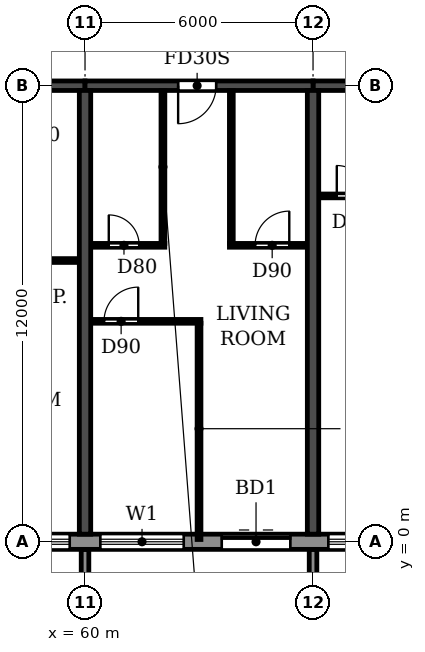
"""IFC4 building model, lengths in metres.
Left out: names, types, materials, properties, quantities, classifications, styles, units other than length and angle.
Written with IfcOpenShell. Run it as: python <this file> out.ifc"""

import sys

from ifc_helpers import new_model, si_unit, direction, frame, frame_2d, origin, place, context, subcontext, project, spatial, polyline, rectangle, outline, extrude, source, transform, mapped, element, fill, save


model = new_model("IFC4")
c1 = context("Model", 3, precision=1e-05, world=origin(), true_north=direction((0.0, 1.0)))
c2 = subcontext(c1, "Body", "Model", "MODEL_VIEW")
j1 = project(units=[si_unit("LENGTHUNIT", "METRE"), si_unit("PLANEANGLEUNIT", "RADIAN")], contexts=[c1])
p1 = place(None, origin())
s1 = spatial("IfcSite", under=j1, at=p1, CompositionType="ELEMENT")
p2 = place(p1, origin())
s2 = spatial("IfcBuilding", under=s1, at=p2, CompositionType="ELEMENT")
p3 = place(p2, frame((0.0, 0.0, 142.2)))
s3 = spatial("IfcBuildingStorey", under=s2, at=p3, CompositionType="ELEMENT", Elevation=142.2)
for number, where, z_axis, x_axis in (
    (1, (60.0, 0.2, 0.0), (0.0, 0.0, 1.0), (0.0, 1.0, 0.0)),
    (2, (66.0, 0.2, 0.0), (0.0, 0.0, 1.0), (0.0, 1.0, 0.0)),
):
    element("IfcWall", number, at=place(p3, frame(where, z_axis=z_axis, x_axis=x_axis)), inside=s3, PredefinedType="SHEAR", context=c2, shape_type="SweptSolid", body=[
        extrude(rectangle(XDim=11.675, YDim=0.3, at=frame_2d((5.837, 0.0))), origin(), (0.0, 0.0, 1.0), 3.07),
    ])
p4 = place(p3, frame((54.0, 12.0, 0.0), z_axis=(0.0, 0.0, 1.0), x_axis=(1.0, 0.0, 0.0)))
e3 = element("IfcWall", 3, at=p4, inside=s3, PredefinedType="SHEAR", context=c2, shape_type="SweptSolid", body=[
    extrude(rectangle(XDim=6.0, YDim=0.25, at=frame_2d((3.0, 0.0))), origin(), (0.0, 0.0, 1.0), 2.47),
])
p5 = place(p4, frame((2.45, 0.0, 0.0)))
e4 = element("IfcOpeningElement", 4, at=p5, cuts=e3, PredefinedType="OPENING", context=c2, shape_type="SweptSolid", body=[
    extrude(rectangle(XDim=1.0, YDim=2.1, at=frame_2d((0.5, 1.05))), frame((0.0, 0.135, 0.0), z_axis=(0.0, -1.0, 0.0), x_axis=(1.0, 0.0, 0.0)), (0.0, 0.0, 1.0), 0.27),
])
p6 = place(p3, frame((60.0, 12.0, 0.0), z_axis=(0.0, 0.0, 1.0), x_axis=(1.0, 0.0, 0.0)))
e5 = element("IfcWall", 5, at=p6, inside=s3, PredefinedType="SHEAR", context=c2, shape_type="SweptSolid", body=[
    extrude(rectangle(XDim=6.0, YDim=0.25, at=frame_2d((3.0, 0.0))), origin(), (0.0, 0.0, 1.0), 2.47),
])
p7 = place(p6, frame((2.45, 0.0, 0.0)))
e6 = element("IfcOpeningElement", 6, at=p7, cuts=e5, PredefinedType="OPENING", context=c2, shape_type="SweptSolid", body=[
    extrude(rectangle(XDim=1.0, YDim=2.1, at=frame_2d((0.5, 1.05))), frame((0.0, 0.135, 0.0), z_axis=(0.0, -1.0, 0.0), x_axis=(1.0, 0.0, 0.0)), (0.0, 0.0, 1.0), 0.27),
])
p8 = place(p3, frame((66.0, 12.0, 0.0), z_axis=(0.0, 0.0, 1.0), x_axis=(1.0, 0.0, 0.0)))
e7 = element("IfcWall", 7, at=p8, inside=s3, PredefinedType="SHEAR", context=c2, shape_type="SweptSolid", body=[
    extrude(rectangle(XDim=6.0, YDim=0.25, at=frame_2d((3.0, 0.0))), origin(), (0.0, 0.0, 1.0), 2.47),
])
p9 = place(p8, frame((2.45, 0.0, 0.0)))
e8 = element("IfcOpeningElement", 8, at=p9, cuts=e7, PredefinedType="OPENING", context=c2, shape_type="SweptSolid", body=[
    extrude(rectangle(XDim=1.0, YDim=2.1, at=frame_2d((0.5, 1.05))), frame((0.0, 0.135, 0.0), z_axis=(0.0, -1.0, 0.0), x_axis=(1.0, 0.0, 0.0)), (0.0, 0.0, 1.0), 0.27),
])
p10 = place(p3, frame((16.683, 0.0, 0.0), z_axis=(0.0, 0.0, 1.0), x_axis=(1.0, 0.0, 0.0)))
e9 = element("IfcWall", 9, at=p10, inside=s3, PredefinedType="STANDARD", context=c2, shape_type="SweptSolid", body=[
    extrude(rectangle(XDim=68.634, YDim=0.4, at=frame_2d((34.317, 0.0))), origin(), (0.0, 0.0, 1.0), 3.07),
])
p11 = place(p10, frame((1.717, 0.0, 0.9)))
e10 = element("IfcOpeningElement", 10, at=p11, cuts=e9, PredefinedType="OPENING", context=c2, shape_type="SweptSolid", body=[
    extrude(rectangle(XDim=2.2, YDim=1.5, at=frame_2d((1.1, 0.75))), frame((0.0, 0.21, 0.0), z_axis=(0.0, -1.0, 0.0), x_axis=(1.0, 0.0, 0.0)), (0.0, 0.0, 1.0), 0.42),
])
p12 = place(p10, frame((4.717, 0.0, 0.9)))
e11 = element("IfcOpeningElement", 11, at=p12, cuts=e9, PredefinedType="OPENING", context=c2, shape_type="SweptSolid", body=[
    extrude(rectangle(XDim=2.2, YDim=1.5, at=frame_2d((1.1, 0.75))), frame((0.0, 0.21, 0.0), z_axis=(0.0, -1.0, 0.0), x_axis=(1.0, 0.0, 0.0)), (0.0, 0.0, 1.0), 0.42),
])
p13 = place(p10, frame((7.717, 0.0, 0.9)))
e12 = element("IfcOpeningElement", 12, at=p13, cuts=e9, PredefinedType="OPENING", context=c2, shape_type="SweptSolid", body=[
    extrude(rectangle(XDim=2.2, YDim=1.5, at=frame_2d((1.1, 0.75))), frame((0.0, 0.21, 0.0), z_axis=(0.0, -1.0, 0.0), x_axis=(1.0, 0.0, 0.0)), (0.0, 0.0, 1.0), 0.42),
])
p14 = place(p10, frame((10.717, 0.0, 0.9)))
e13 = element("IfcOpeningElement", 13, at=p14, cuts=e9, PredefinedType="OPENING", context=c2, shape_type="SweptSolid", body=[
    extrude(rectangle(XDim=2.2, YDim=1.5, at=frame_2d((1.1, 0.75))), frame((0.0, 0.21, 0.0), z_axis=(0.0, -1.0, 0.0), x_axis=(1.0, 0.0, 0.0)), (0.0, 0.0, 1.0), 0.42),
])
p15 = place(p10, frame((13.717, 0.0, 0.9)))
e14 = element("IfcOpeningElement", 14, at=p15, cuts=e9, PredefinedType="OPENING", context=c2, shape_type="SweptSolid", body=[
    extrude(rectangle(XDim=2.2, YDim=1.5, at=frame_2d((1.1, 0.75))), frame((0.0, 0.21, 0.0), z_axis=(0.0, -1.0, 0.0), x_axis=(1.0, 0.0, 0.0)), (0.0, 0.0, 1.0), 0.42),
])
p16 = place(p10, frame((16.717, 0.0, 0.9)))
e15 = element("IfcOpeningElement", 15, at=p16, cuts=e9, PredefinedType="OPENING", context=c2, shape_type="SweptSolid", body=[
    extrude(rectangle(XDim=2.2, YDim=1.5, at=frame_2d((1.1, 0.75))), frame((0.0, 0.21, 0.0), z_axis=(0.0, -1.0, 0.0), x_axis=(1.0, 0.0, 0.0)), (0.0, 0.0, 1.0), 0.42),
])
p17 = place(p10, frame((19.717, 0.0, 0.9)))
e16 = element("IfcOpeningElement", 16, at=p17, cuts=e9, PredefinedType="OPENING", context=c2, shape_type="SweptSolid", body=[
    extrude(rectangle(XDim=2.2, YDim=1.5, at=frame_2d((1.1, 0.75))), frame((0.0, 0.21, 0.0), z_axis=(0.0, -1.0, 0.0), x_axis=(1.0, 0.0, 0.0)), (0.0, 0.0, 1.0), 0.42),
])
p18 = place(p10, frame((22.717, 0.0, 0.9)))
e17 = element("IfcOpeningElement", 17, at=p18, cuts=e9, PredefinedType="OPENING", context=c2, shape_type="SweptSolid", body=[
    extrude(rectangle(XDim=2.2, YDim=1.5, at=frame_2d((1.1, 0.75))), frame((0.0, 0.21, 0.0), z_axis=(0.0, -1.0, 0.0), x_axis=(1.0, 0.0, 0.0)), (0.0, 0.0, 1.0), 0.42),
])
p19 = place(p10, frame((25.717, 0.0, 0.9)))
e18 = element("IfcOpeningElement", 18, at=p19, cuts=e9, PredefinedType="OPENING", context=c2, shape_type="SweptSolid", body=[
    extrude(rectangle(XDim=2.2, YDim=1.5, at=frame_2d((1.1, 0.75))), frame((0.0, 0.21, 0.0), z_axis=(0.0, -1.0, 0.0), x_axis=(1.0, 0.0, 0.0)), (0.0, 0.0, 1.0), 0.42),
])
p20 = place(p10, frame((28.717, 0.0, 0.9)))
e19 = element("IfcOpeningElement", 19, at=p20, cuts=e9, PredefinedType="OPENING", context=c2, shape_type="SweptSolid", body=[
    extrude(rectangle(XDim=2.2, YDim=1.5, at=frame_2d((1.1, 0.75))), frame((0.0, 0.21, 0.0), z_axis=(0.0, -1.0, 0.0), x_axis=(1.0, 0.0, 0.0)), (0.0, 0.0, 1.0), 0.42),
])
p21 = place(p10, frame((31.717, 0.0, 0.9)))
e20 = element("IfcOpeningElement", 20, at=p21, cuts=e9, PredefinedType="OPENING", context=c2, shape_type="SweptSolid", body=[
    extrude(rectangle(XDim=2.2, YDim=1.5, at=frame_2d((1.1, 0.75))), frame((0.0, 0.21, 0.0), z_axis=(0.0, -1.0, 0.0), x_axis=(1.0, 0.0, 0.0)), (0.0, 0.0, 1.0), 0.42),
])
p22 = place(p10, frame((34.917, 0.0, 0.0)))
e21 = element("IfcOpeningElement", 21, at=p22, cuts=e9, PredefinedType="OPENING", context=c2, shape_type="SweptSolid", body=[
    extrude(rectangle(XDim=1.8, YDim=2.4, at=frame_2d((0.9, 1.2))), frame((0.0, 0.21, 0.0), z_axis=(0.0, -1.0, 0.0), x_axis=(1.0, 0.0, 0.0)), (0.0, 0.0, 1.0), 0.42),
])
p23 = place(p10, frame((37.717, 0.0, 0.9)))
e22 = element("IfcOpeningElement", 22, at=p23, cuts=e9, PredefinedType="OPENING", context=c2, shape_type="SweptSolid", body=[
    extrude(rectangle(XDim=2.2, YDim=1.5, at=frame_2d((1.1, 0.75))), frame((0.0, 0.21, 0.0), z_axis=(0.0, -1.0, 0.0), x_axis=(1.0, 0.0, 0.0)), (0.0, 0.0, 1.0), 0.42),
])
p24 = place(p10, frame((40.717, 0.0, 0.9)))
e23 = element("IfcOpeningElement", 23, at=p24, cuts=e9, PredefinedType="OPENING", context=c2, shape_type="SweptSolid", body=[
    extrude(rectangle(XDim=2.2, YDim=1.5, at=frame_2d((1.1, 0.75))), frame((0.0, 0.21, 0.0), z_axis=(0.0, -1.0, 0.0), x_axis=(1.0, 0.0, 0.0)), (0.0, 0.0, 1.0), 0.42),
])
p25 = place(p10, frame((43.717, 0.0, 0.9)))
e24 = element("IfcOpeningElement", 24, at=p25, cuts=e9, PredefinedType="OPENING", context=c2, shape_type="SweptSolid", body=[
    extrude(rectangle(XDim=2.2, YDim=1.5, at=frame_2d((1.1, 0.75))), frame((0.0, 0.21, 0.0), z_axis=(0.0, -1.0, 0.0), x_axis=(1.0, 0.0, 0.0)), (0.0, 0.0, 1.0), 0.42),
])
p26 = place(p10, frame((46.917, 0.0, 0.0)))
e25 = element("IfcOpeningElement", 25, at=p26, cuts=e9, PredefinedType="OPENING", context=c2, shape_type="SweptSolid", body=[
    extrude(rectangle(XDim=1.8, YDim=2.4, at=frame_2d((0.9, 1.2))), frame((0.0, 0.21, 0.0), z_axis=(0.0, -1.0, 0.0), x_axis=(1.0, 0.0, 0.0)), (0.0, 0.0, 1.0), 0.42),
])
p27 = place(p10, frame((49.717, 0.0, 0.9)))
e26 = element("IfcOpeningElement", 26, at=p27, cuts=e9, PredefinedType="OPENING", context=c2, shape_type="SweptSolid", body=[
    extrude(rectangle(XDim=2.2, YDim=1.5, at=frame_2d((1.1, 0.75))), frame((0.0, 0.21, 0.0), z_axis=(0.0, -1.0, 0.0), x_axis=(1.0, 0.0, 0.0)), (0.0, 0.0, 1.0), 0.42),
])
p28 = place(p10, frame((52.717, 0.0, 0.9)))
e27 = element("IfcOpeningElement", 27, at=p28, cuts=e9, PredefinedType="OPENING", context=c2, shape_type="SweptSolid", body=[
    extrude(rectangle(XDim=2.2, YDim=1.5, at=frame_2d((1.1, 0.75))), frame((0.0, 0.21, 0.0), z_axis=(0.0, -1.0, 0.0), x_axis=(1.0, 0.0, 0.0)), (0.0, 0.0, 1.0), 0.42),
])
p29 = place(p10, frame((55.717, 0.0, 0.9)))
e28 = element("IfcOpeningElement", 28, at=p29, cuts=e9, PredefinedType="OPENING", context=c2, shape_type="SweptSolid", body=[
    extrude(rectangle(XDim=2.2, YDim=1.5, at=frame_2d((1.1, 0.75))), frame((0.0, 0.21, 0.0), z_axis=(0.0, -1.0, 0.0), x_axis=(1.0, 0.0, 0.0)), (0.0, 0.0, 1.0), 0.42),
])
p30 = place(p10, frame((58.717, 0.0, 0.9)))
e29 = element("IfcOpeningElement", 29, at=p30, cuts=e9, PredefinedType="OPENING", context=c2, shape_type="SweptSolid", body=[
    extrude(rectangle(XDim=2.2, YDim=1.5, at=frame_2d((1.1, 0.75))), frame((0.0, 0.21, 0.0), z_axis=(0.0, -1.0, 0.0), x_axis=(1.0, 0.0, 0.0)), (0.0, 0.0, 1.0), 0.42),
])
p31 = place(p10, frame((61.717, 0.0, 0.9)))
e30 = element("IfcOpeningElement", 30, at=p31, cuts=e9, PredefinedType="OPENING", context=c2, shape_type="SweptSolid", body=[
    extrude(rectangle(XDim=2.2, YDim=1.5, at=frame_2d((1.1, 0.75))), frame((0.0, 0.21, 0.0), z_axis=(0.0, -1.0, 0.0), x_axis=(1.0, 0.0, 0.0)), (0.0, 0.0, 1.0), 0.42),
])
p32 = place(p10, frame((64.717, 0.0, 0.9)))
e31 = element("IfcOpeningElement", 31, at=p32, cuts=e9, PredefinedType="OPENING", context=c2, shape_type="SweptSolid", body=[
    extrude(rectangle(XDim=2.2, YDim=1.5, at=frame_2d((1.1, 0.75))), frame((0.0, 0.21, 0.0), z_axis=(0.0, -1.0, 0.0), x_axis=(1.0, 0.0, 0.0)), (0.0, 0.0, 1.0), 0.42),
])
m1 = source(origin(), c2, "Body", "SweptSolid", [
    extrude(outline(polyline([(0.0, 0.0), (0.2, 0.0), (0.2, 1.65), (0.0, 1.65), (0.0, 0.0)])), origin(), (0.0, 0.0, 1.0), 3.1),
])
for number, where in (
    (32, (59.9, -1.85, 0.0)),
    (33, (65.9, -1.85, 0.0)),
):
    element("IfcWall", number, at=place(p3, frame(where)), inside=s3, PredefinedType="STANDARD", context=c2, shape_type="MappedRepresentation", body=[
        mapped(m1, transform((0.0, 0.0, 0.0))),
    ])
p33 = place(p3, frame((60.16, 5.8, 0.0), z_axis=(0.0, 0.0, 1.0), x_axis=(1.0, 0.0, 0.0)))
e34 = element("IfcWall", 34, at=p33, inside=s3, PredefinedType="PARTITIONING", context=c2, shape_type="SweptSolid", body=[
    extrude(rectangle(XDim=2.89, YDim=0.1, at=frame_2d((1.445, 0.0))), origin(), (0.0, 0.0, 1.0), 3.07),
])
p34 = place(p33, frame((0.34, 0.0, 0.0)))
e35 = element("IfcOpeningElement", 35, at=p34, cuts=e34, PredefinedType="OPENING", context=c2, shape_type="SweptSolid", body=[
    extrude(rectangle(XDim=0.9, YDim=2.1, at=frame_2d((0.45, 1.05))), frame((0.0, 0.06, 0.0), z_axis=(0.0, -1.0, 0.0), x_axis=(1.0, 0.0, 0.0)), (0.0, 0.0, 1.0), 0.12),
])
p35 = place(p3, frame((57.8, 7.4, 0.0), z_axis=(0.0, 0.0, 1.0), x_axis=(1.0, 0.0, 0.0)))
e36 = element("IfcWall", 36, at=p35, inside=s3, PredefinedType="PARTITIONING", context=c2, shape_type="SweptSolid", body=[
    extrude(rectangle(XDim=2.04, YDim=0.1, at=frame_2d((1.02, 0.0))), origin(), (0.0, 0.0, 1.0), 3.07),
])
p36 = place(p3, frame((60.16, 7.8, 0.0), z_axis=(0.0, 0.0, 1.0), x_axis=(1.0, 0.0, 0.0)))
e37 = element("IfcWall", 37, at=p36, inside=s3, PredefinedType="PARTITIONING", context=c2, shape_type="SweptSolid", body=[
    extrude(rectangle(XDim=1.94, YDim=0.1, at=frame_2d((0.97, 0.0))), origin(), (0.0, 0.0, 1.0), 3.07),
])
p37 = place(p36, frame((0.465, 0.0, 0.0)))
e38 = element("IfcOpeningElement", 38, at=p37, cuts=e37, PredefinedType="OPENING", context=c2, shape_type="SweptSolid", body=[
    extrude(rectangle(XDim=0.8, YDim=2.1, at=frame_2d((0.4, 1.05))), frame((0.0, 0.06, 0.0), z_axis=(0.0, -1.0, 0.0), x_axis=(1.0, 0.0, 0.0)), (0.0, 0.0, 1.0), 0.12),
])
p38 = place(p3, frame((63.8, 7.8, 0.0), z_axis=(0.0, 0.0, 1.0), x_axis=(1.0, 0.0, 0.0)))
e39 = element("IfcWall", 39, at=p38, inside=s3, PredefinedType="PARTITIONING", context=c2, shape_type="SweptSolid", body=[
    extrude(rectangle(XDim=2.04, YDim=0.1, at=frame_2d((1.02, 0.0))), origin(), (0.0, 0.0, 1.0), 3.07),
])
p39 = place(p38, frame((0.675, 0.0, 0.0)))
e40 = element("IfcOpeningElement", 40, at=p39, cuts=e39, PredefinedType="OPENING", context=c2, shape_type="SweptSolid", body=[
    extrude(rectangle(XDim=0.9, YDim=2.1, at=frame_2d((0.45, 1.05))), frame((0.0, 0.06, 0.0), z_axis=(0.0, -1.0, 0.0), x_axis=(1.0, 0.0, 0.0)), (0.0, 0.0, 1.0), 0.12),
])
p40 = place(p3, frame((66.16, 9.1, 0.0), z_axis=(0.0, 0.0, 1.0), x_axis=(1.0, 0.0, 0.0)))
e41 = element("IfcWall", 41, at=p40, inside=s3, PredefinedType="PARTITIONING", context=c2, shape_type="SweptSolid", body=[
    extrude(rectangle(XDim=1.94, YDim=0.1, at=frame_2d((0.97, 0.0))), origin(), (0.0, 0.0, 1.0), 3.07),
])
p41 = place(p40, frame((0.465, 0.0, 0.0)))
e42 = element("IfcOpeningElement", 42, at=p41, cuts=e41, PredefinedType="OPENING", context=c2, shape_type="SweptSolid", body=[
    extrude(rectangle(XDim=0.8, YDim=2.1, at=frame_2d((0.4, 1.05))), frame((0.0, 0.06, 0.0), z_axis=(0.0, -1.0, 0.0), x_axis=(1.0, 0.0, 0.0)), (0.0, 0.0, 1.0), 0.12),
])
p42 = place(p3, frame((62.05, 7.85, 0.0), z_axis=(0.0, 0.0, 1.0), x_axis=(0.0, 1.0, 0.0)))
e43 = element("IfcWall", 43, at=p42, inside=s3, PredefinedType="PARTITIONING", context=c2, shape_type="SweptSolid", body=[
    extrude(rectangle(XDim=4.015, YDim=0.1, at=frame_2d((2.007, 0.0))), origin(), (0.0, 0.0, 1.0), 3.07),
])
p43 = place(p3, frame((63.0, 0.06, 0.0), z_axis=(0.0, 0.0, 1.0), x_axis=(0.0, 1.0, 0.0)))
e44 = element("IfcWall", 44, at=p43, inside=s3, PredefinedType="PARTITIONING", context=c2, shape_type="SweptSolid", body=[
    extrude(rectangle(XDim=5.69, YDim=0.1, at=frame_2d((2.845, 0.0))), origin(), (0.0, 0.0, 1.0), 3.07),
])
p44 = place(p3, frame((63.85, 7.85, 0.0), z_axis=(0.0, 0.0, 1.0), x_axis=(0.0, 1.0, 0.0)))
e45 = element("IfcWall", 45, at=p44, inside=s3, PredefinedType="PARTITIONING", context=c2, shape_type="SweptSolid", body=[
    extrude(rectangle(XDim=4.015, YDim=0.1, at=frame_2d((2.007, 0.0))), origin(), (0.0, 0.0, 1.0), 3.07),
])
p45 = place(p24, origin())
e46 = element("IfcWindow", 46, at=p45, inside=s3, PartitioningType="DOUBLE_PANEL_HORIZONTAL", PredefinedType="WINDOW", context=c2, shape_type="SweptSolid", body=[
    extrude(rectangle(XDim=2.2, YDim=1.5, at=frame_2d((1.1, 0.75))), frame((0.0, 0.03, 0.0), z_axis=(0.0, -1.0, 0.0), x_axis=(1.0, 0.0, 0.0)), (0.0, 0.0, 1.0), 0.06),
])
fill(e23, e46)
p46 = place(p25, origin())
e47 = element("IfcWindow", 47, at=p46, inside=s3, PartitioningType="DOUBLE_PANEL_HORIZONTAL", PredefinedType="WINDOW", context=c2, shape_type="SweptSolid", body=[
    extrude(rectangle(XDim=2.2, YDim=1.5, at=frame_2d((1.1, 0.75))), frame((0.0, 0.03, 0.0), z_axis=(0.0, -1.0, 0.0), x_axis=(1.0, 0.0, 0.0)), (0.0, 0.0, 1.0), 0.06),
])
fill(e24, e47)
p47 = place(p26, origin())
e48 = element("IfcDoor", 48, at=p47, inside=s3, OperationType="DOUBLE_DOOR_SLIDING", PredefinedType="DOOR", context=c2, shape_type="SweptSolid", body=[
    extrude(rectangle(XDim=1.8, YDim=2.4, at=frame_2d((0.9, 1.2))), frame((0.0, 0.025, 0.0), z_axis=(0.0, -1.0, 0.0), x_axis=(1.0, 0.0, 0.0)), (0.0, 0.0, 1.0), 0.05),
])
fill(e25, e48)
p48 = place(p27, origin())
e49 = element("IfcWindow", 49, at=p48, inside=s3, PartitioningType="DOUBLE_PANEL_HORIZONTAL", PredefinedType="WINDOW", context=c2, shape_type="SweptSolid", body=[
    extrude(rectangle(XDim=2.2, YDim=1.5, at=frame_2d((1.1, 0.75))), frame((0.0, 0.03, 0.0), z_axis=(0.0, -1.0, 0.0), x_axis=(1.0, 0.0, 0.0)), (0.0, 0.0, 1.0), 0.06),
])
fill(e26, e49)
p49 = place(p34, origin())
e50 = element("IfcDoor", 50, at=p49, inside=s3, OperationType="SINGLE_SWING_RIGHT", PredefinedType="DOOR", context=c2, shape_type="SweptSolid", body=[
    extrude(rectangle(XDim=0.9, YDim=2.1, at=frame_2d((0.45, 1.05))), frame((0.0, 0.025, 0.0), z_axis=(0.0, -1.0, 0.0), x_axis=(1.0, 0.0, 0.0)), (0.0, 0.0, 1.0), 0.05),
])
fill(e35, e50)
p50 = place(p37, origin())
e51 = element("IfcDoor", 51, at=p50, inside=s3, OperationType="SINGLE_SWING_LEFT", PredefinedType="DOOR", context=c2, shape_type="SweptSolid", body=[
    extrude(rectangle(XDim=0.8, YDim=2.1, at=frame_2d((0.4, 1.05))), frame((0.0, 0.025, 0.0), z_axis=(0.0, -1.0, 0.0), x_axis=(1.0, 0.0, 0.0)), (0.0, 0.0, 1.0), 0.05),
])
fill(e38, e51)
p51 = place(p7, frame((1.0, 0.0, 0.0), z_axis=(0.0, 0.0, 1.0), x_axis=(-1.0, 0.0, 0.0)))
e52 = element("IfcDoor", 52, at=p51, inside=s3, OperationType="SINGLE_SWING_RIGHT", PredefinedType="DOOR", context=c2, shape_type="SweptSolid", body=[
    extrude(rectangle(XDim=1.0, YDim=2.1, at=frame_2d((0.5, 1.05))), frame((0.0, 0.025, 0.0), z_axis=(0.0, -1.0, 0.0), x_axis=(1.0, 0.0, 0.0)), (0.0, 0.0, 1.0), 0.05),
])
fill(e6, e52)
p52 = place(p39, origin())
e53 = element("IfcDoor", 53, at=p52, inside=s3, OperationType="SINGLE_SWING_RIGHT", PredefinedType="DOOR", context=c2, shape_type="SweptSolid", body=[
    extrude(rectangle(XDim=0.9, YDim=2.1, at=frame_2d((0.45, 1.05))), frame((0.0, 0.025, 0.0), z_axis=(0.0, -1.0, 0.0), x_axis=(1.0, 0.0, 0.0)), (0.0, 0.0, 1.0), 0.05),
])
fill(e40, e53)
p53 = place(p41, origin())
e54 = element("IfcDoor", 54, at=p53, inside=s3, OperationType="SINGLE_SWING_LEFT", PredefinedType="DOOR", context=c2, shape_type="SweptSolid", body=[
    extrude(rectangle(XDim=0.8, YDim=2.1, at=frame_2d((0.4, 1.05))), frame((0.0, 0.025, 0.0), z_axis=(0.0, -1.0, 0.0), x_axis=(1.0, 0.0, 0.0)), (0.0, 0.0, 1.0), 0.05),
])
fill(e42, e54)
save(model, sys.argv[1])
